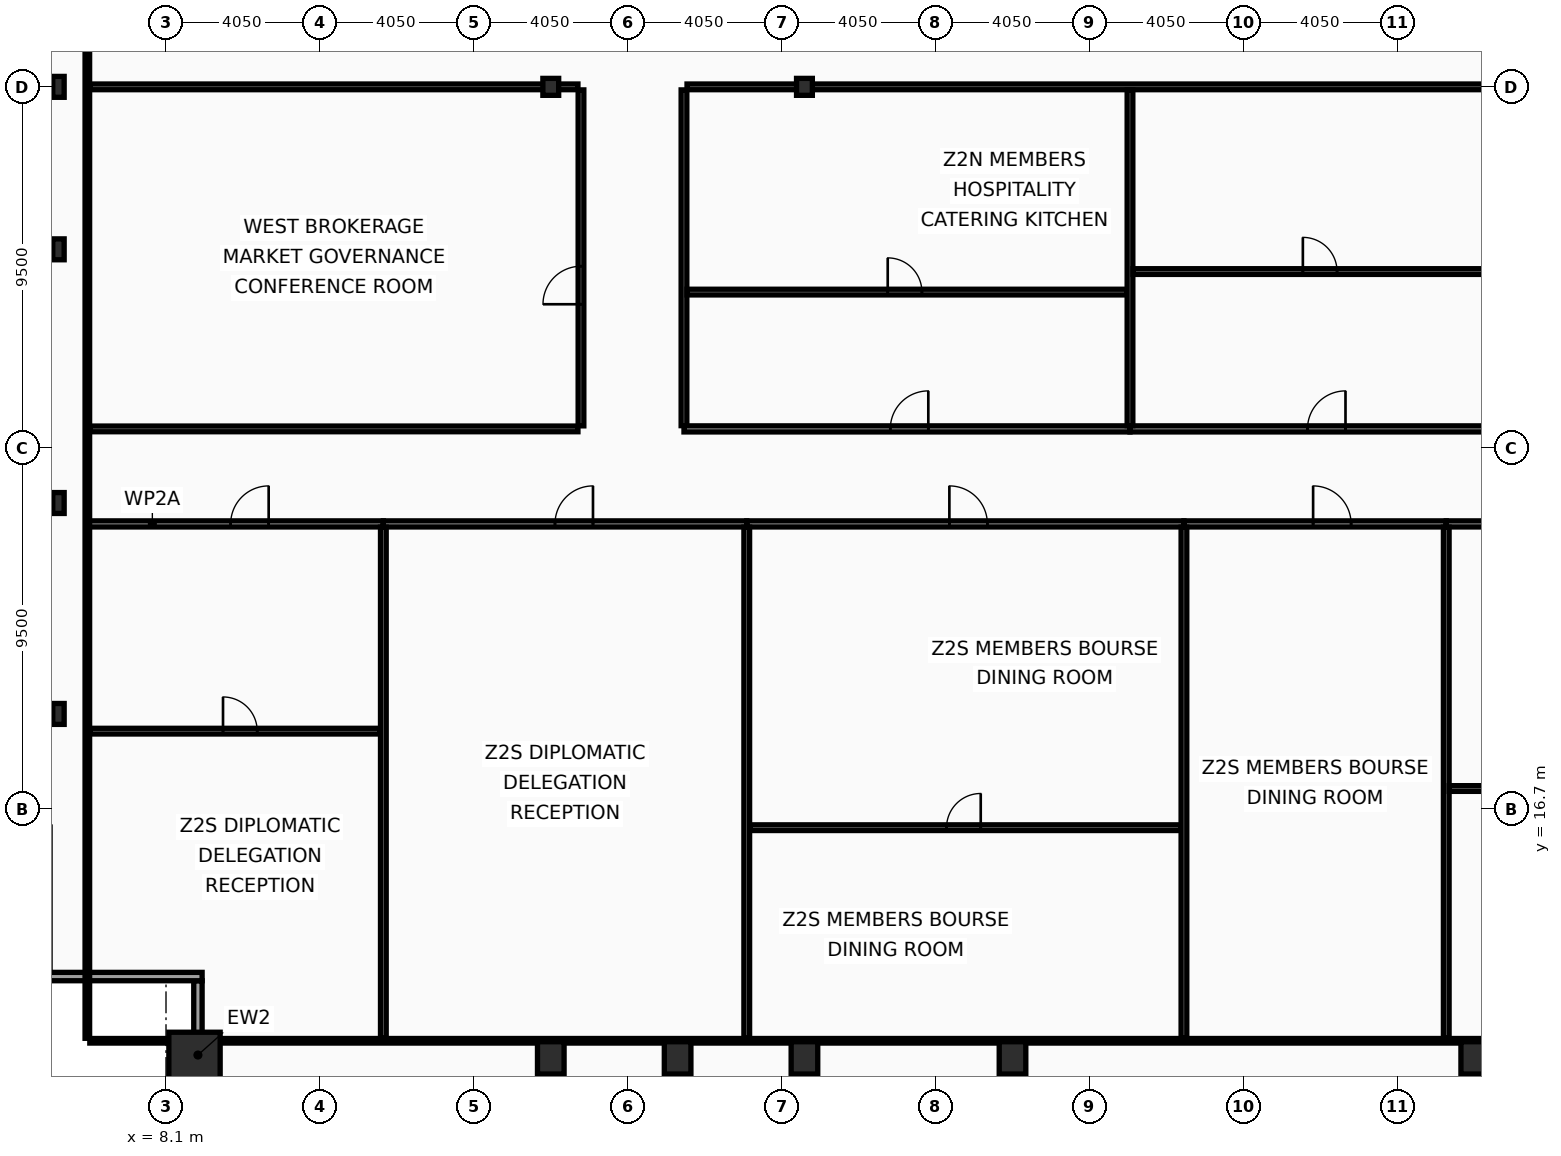
"""IFC4 building model, lengths in metres.
Left out: names, types, materials, properties, quantities, classifications, styles, units other than length and angle.
Written with IfcOpenShell. Run it as: python <this file> out.ifc"""

import sys

from ifc_helpers import new_model, si_unit, direction, frame, frame_2d, origin, origin_2d, place, context, subcontext, project, spatial, rectangle, hollow_rectangle, i_section, extrude, element, fill, save


model = new_model("IFC4")
c1 = context("Model", 3, precision=1e-05, world=origin(), true_north=direction((0.0, 1.0)))
c2 = subcontext(c1, "Body", "Model", "MODEL_VIEW")
j1 = project(units=[si_unit("LENGTHUNIT", "METRE"), si_unit("PLANEANGLEUNIT", "RADIAN")], contexts=[c1])
p1 = place(None, origin())
s1 = spatial("IfcSite", under=j1, at=p1, CompositionType="ELEMENT")
p2 = place(p1, origin())
s2 = spatial("IfcBuilding", under=s1, at=p2, CompositionType="ELEMENT")
p3 = place(p2, frame((0.0, 0.0, 143.4)))
s3 = spatial("IfcBuildingStorey", under=s2, at=p3, CompositionType="ELEMENT", Elevation=143.4)
p4 = place(p3, frame((8.85, 10.15, 0.0), z_axis=(0.0, 0.0, 1.0), x_axis=(1.0, 0.0, 0.0)))
e1 = element("IfcColumn", 1, at=p4, inside=s3, PredefinedType="COLUMN", context=c2, shape_type="SweptSolid", body=[
    extrude(hollow_rectangle(XDim=1.35, YDim=1.35, WallThickness=0.065, at=origin_2d()), origin(), (0.0, 0.0, 1.0), 3.6),
])
for number, where, z_axis, x_axis in (
    (2, (18.225, 10.15, 0.0), (0.0, 0.0, 1.0), (1.0, 0.0, 0.0)),
    (3, (21.562, 10.15, 0.0), (0.0, 0.0, 1.0), (1.0, 0.0, 0.0)),
    (4, (24.9, 10.15, 0.0), (0.0, 0.0, 1.0), (1.0, 0.0, 0.0)),
    (5, (30.375, 10.15, 0.0), (0.0, 0.0, 1.0), (1.0, 0.0, 0.0)),
    (6, (42.525, 10.15, 0.0), (0.0, 0.0, 1.0), (1.0, 0.0, 0.0)),
):
    element("IfcColumn", number, at=place(p3, frame(where, z_axis=z_axis, x_axis=x_axis)), inside=s3, PredefinedType="COLUMN", context=c2, shape_type="SweptSolid", body=[
        extrude(hollow_rectangle(XDim=0.7, YDim=0.85, WallThickness=0.05, at=origin_2d()), origin(), (0.0, 0.0, 1.0), 3.6),
    ])
for number, where, z_axis, x_axis in (
    (7, (5.27, 19.2, 0.0), (0.0, 0.0, 1.0), (1.0, 0.0, 0.0)),
    (8, (5.27, 24.75, 0.0), (0.0, 0.0, 1.0), (1.0, 0.0, 0.0)),
    (9, (5.27, 31.425, 0.0), (0.0, 0.0, 1.0), (1.0, 0.0, 0.0)),
    (10, (5.27, 35.7, 0.0), (0.0, 0.0, 1.0), (1.0, 0.0, 0.0)),
):
    element("IfcColumn", number, at=place(p3, frame(where, z_axis=z_axis, x_axis=x_axis)), inside=s3, PredefinedType="COLUMN", context=c2, shape_type="SweptSolid", body=[
        extrude(i_section(OverallWidth=0.3, OverallDepth=0.55, WebThickness=0.015, FlangeThickness=0.029, at=origin_2d()), origin(), (0.0, 0.0, 1.0), 3.6),
    ])
for number, where, z_axis, x_axis in (
    (11, (18.225, 35.7, 0.0), (0.0, 0.0, 1.0), (1.0, 0.0, 0.0)),
    (12, (24.9, 35.7, 0.0), (0.0, 0.0, 1.0), (1.0, 0.0, 0.0)),
):
    element("IfcColumn", number, at=place(p3, frame(where, z_axis=z_axis, x_axis=x_axis)), inside=s3, PredefinedType="COLUMN", context=c2, shape_type="SweptSolid", body=[
        extrude(i_section(OverallWidth=0.416, OverallDepth=0.446, WebThickness=0.039, FlangeThickness=0.063, at=origin_2d()), origin(), (0.0, 0.0, 1.0), 3.6),
    ])
p5 = place(p3, frame((8.94, 8.27, 0.0), z_axis=(0.0, 0.0, 1.0), x_axis=(0.0, 1.0, 0.0)))
e13 = element("IfcWall", 13, at=p5, inside=s3, PredefinedType="SOLIDWALL", context=c2, shape_type="SweptSolid", body=[
    extrude(rectangle(XDim=3.91, YDim=0.22, at=frame_2d((1.955, 0.0))), origin(), (0.0, 0.0, 1.0), 2.83),
])
p6 = place(p3, frame((9.05, 12.29, 0.0), z_axis=(0.0, 0.0, 1.0), x_axis=(-1.0, 0.0, 0.0)))
e14 = element("IfcWall", 14, at=p6, inside=s3, PredefinedType="SOLIDWALL", context=c2, shape_type="SweptSolid", body=[
    extrude(rectangle(XDim=4.22, YDim=0.22, at=frame_2d((2.11, 0.0))), origin(), (0.0, 0.0, 1.0), 2.83),
])
p7 = place(p3, frame((6.03, 24.2, 0.0), z_axis=(0.0, 0.0, 1.0), x_axis=(1.0, 0.0, 0.0)))
e15 = element("IfcWall", 15, at=p7, inside=s3, PredefinedType="PARTITIONING", context=c2, shape_type="SweptSolid", body=[
    extrude(rectangle(XDim=7.789, YDim=0.16, at=frame_2d((3.895, 0.0))), origin(), (0.0, 0.0, 1.0), 3.44),
])
p8 = place(p7, frame((3.771, 0.0, 0.0)))
e16 = element("IfcOpeningElement", 16, at=p8, cuts=e15, PredefinedType="OPENING", context=c2, shape_type="SweptSolid", body=[
    extrude(rectangle(XDim=1.0, YDim=2.05, at=frame_2d((0.5, 1.025))), frame((0.0, 0.09, 0.0), z_axis=(0.0, -1.0, 0.0), x_axis=(1.0, 0.0, 0.0)), (0.0, 0.0, 1.0), 0.18),
])
p9 = place(p3, frame((6.095, 18.747, 0.0), z_axis=(0.0, 0.0, 1.0), x_axis=(1.0, 0.0, 0.0)))
e17 = element("IfcWall", 17, at=p9, inside=s3, PredefinedType="PARTITIONING", context=c2, shape_type="SweptSolid", body=[
    extrude(rectangle(XDim=7.644, YDim=0.15, at=frame_2d((3.822, 0.0))), origin(), (0.0, 0.0, 1.0), 2.73),
])
p10 = place(p9, frame((3.505, 0.0, 0.0)))
e18 = element("IfcOpeningElement", 18, at=p10, cuts=e17, PredefinedType="OPENING", context=c2, shape_type="SweptSolid", body=[
    extrude(rectangle(XDim=0.9, YDim=2.05, at=frame_2d((0.45, 1.025))), frame((0.0, 0.085, 0.0), z_axis=(0.0, -1.0, 0.0), x_axis=(1.0, 0.0, 0.0)), (0.0, 0.0, 1.0), 0.17),
])
p11 = place(p3, frame((13.819, 24.2, 0.0), z_axis=(0.0, 0.0, 1.0), x_axis=(1.0, 0.0, 0.0)))
e19 = element("IfcWall", 19, at=p11, inside=s3, PredefinedType="PARTITIONING", context=c2, shape_type="SweptSolid", body=[
    extrude(rectangle(XDim=9.563, YDim=0.16, at=frame_2d((4.781, 0.0))), origin(), (0.0, 0.0, 1.0), 2.73),
])
p12 = place(p11, frame((4.516, 0.0, 0.0)))
e20 = element("IfcOpeningElement", 20, at=p12, cuts=e19, PredefinedType="OPENING", context=c2, shape_type="SweptSolid", body=[
    extrude(rectangle(XDim=1.0, YDim=2.05, at=frame_2d((0.5, 1.025))), frame((0.0, 0.09, 0.0), z_axis=(0.0, -1.0, 0.0), x_axis=(1.0, 0.0, 0.0)), (0.0, 0.0, 1.0), 0.18),
])
p13 = place(p3, frame((13.819, 10.665, 0.0), z_axis=(0.0, 0.0, 1.0), x_axis=(0.0, 1.0, 0.0)))
e21 = element("IfcWall", 21, at=p13, inside=s3, PredefinedType="PARTITIONING", context=c2, shape_type="SweptSolid", body=[
    extrude(rectangle(XDim=13.45, YDim=0.15, at=frame_2d((6.725, 0.0))), origin(), (0.0, 0.0, 1.0), 2.73),
])
p14 = place(p3, frame((23.382, 24.2, 0.0), z_axis=(0.0, 0.0, 1.0), x_axis=(1.0, 0.0, 0.0)))
e22 = element("IfcWall", 22, at=p14, inside=s3, PredefinedType="PARTITIONING", context=c2, shape_type="SweptSolid", body=[
    extrude(rectangle(XDim=11.504, YDim=0.16, at=frame_2d((5.752, 0.0))), origin(), (0.0, 0.0, 1.0), 2.73),
])
p15 = place(p14, frame((5.332, 0.0, 0.0)))
e23 = element("IfcOpeningElement", 23, at=p15, cuts=e22, PredefinedType="OPENING", context=c2, shape_type="SweptSolid", body=[
    extrude(rectangle(XDim=1.0, YDim=2.05, at=frame_2d((0.5, 1.025))), frame((0.0, 0.09, 0.0), z_axis=(0.0, -1.0, 0.0), x_axis=(1.0, 0.0, 0.0)), (0.0, 0.0, 1.0), 0.18),
])
p16 = place(p3, frame((23.382, 10.665, 0.0), z_axis=(0.0, 0.0, 1.0), x_axis=(0.0, 1.0, 0.0)))
e24 = element("IfcWall", 24, at=p16, inside=s3, PredefinedType="PARTITIONING", context=c2, shape_type="SweptSolid", body=[
    extrude(rectangle(XDim=13.45, YDim=0.15, at=frame_2d((6.725, 0.0))), origin(), (0.0, 0.0, 1.0), 2.93),
])
p17 = place(p3, frame((23.462, 16.207, 0.0), z_axis=(0.0, 0.0, 1.0), x_axis=(1.0, 0.0, 0.0)))
e25 = element("IfcWall", 25, at=p17, inside=s3, PredefinedType="PARTITIONING", context=c2, shape_type="SweptSolid", body=[
    extrude(rectangle(XDim=11.344, YDim=0.15, at=frame_2d((5.672, 0.0))), origin(), (0.0, 0.0, 1.0), 2.73),
])
p18 = place(p17, frame((5.177, 0.0, 0.0)))
e26 = element("IfcOpeningElement", 26, at=p18, cuts=e25, PredefinedType="OPENING", context=c2, shape_type="SweptSolid", body=[
    extrude(rectangle(XDim=0.9, YDim=2.05, at=frame_2d((0.45, 1.025))), frame((0.0, 0.085, 0.0), z_axis=(0.0, -1.0, 0.0), x_axis=(1.0, 0.0, 0.0)), (0.0, 0.0, 1.0), 0.17),
])
p19 = place(p3, frame((34.886, 24.2, 0.0), z_axis=(0.0, 0.0, 1.0), x_axis=(1.0, 0.0, 0.0)))
e27 = element("IfcWall", 27, at=p19, inside=s3, PredefinedType="PARTITIONING", context=c2, shape_type="SweptSolid", body=[
    extrude(rectangle(XDim=6.902, YDim=0.16, at=frame_2d((3.451, 0.0))), origin(), (0.0, 0.0, 1.0), 3.44),
])
p20 = place(p19, frame((3.399, 0.0, 0.0)))
e28 = element("IfcOpeningElement", 28, at=p20, cuts=e27, PredefinedType="OPENING", context=c2, shape_type="SweptSolid", body=[
    extrude(rectangle(XDim=1.0, YDim=2.05, at=frame_2d((0.5, 1.025))), frame((0.0, 0.09, 0.0), z_axis=(0.0, -1.0, 0.0), x_axis=(1.0, 0.0, 0.0)), (0.0, 0.0, 1.0), 0.18),
])
p21 = place(p3, frame((34.886, 10.665, 0.0), z_axis=(0.0, 0.0, 1.0), x_axis=(0.0, 1.0, 0.0)))
e29 = element("IfcWall", 29, at=p21, inside=s3, PredefinedType="PARTITIONING", context=c2, shape_type="SweptSolid", body=[
    extrude(rectangle(XDim=13.45, YDim=0.15, at=frame_2d((6.725, 0.0))), origin(), (0.0, 0.0, 1.0), 2.93),
])
p22 = place(p3, frame((41.789, 24.2, 0.0), z_axis=(0.0, 0.0, 1.0), x_axis=(1.0, 0.0, 0.0)))
e30 = element("IfcWall", 30, at=p22, inside=s3, PredefinedType="PARTITIONING", context=c2, shape_type="SweptSolid", body=[
    extrude(rectangle(XDim=7.214, YDim=0.16, at=frame_2d((3.607, 0.0))), origin(), (0.0, 0.0, 1.0), 2.73),
])
p23 = place(p22, frame((3.53, 0.0, 0.0)))
e31 = element("IfcOpeningElement", 31, at=p23, cuts=e30, PredefinedType="OPENING", context=c2, shape_type="SweptSolid", body=[
    extrude(rectangle(XDim=1.0, YDim=2.05, at=frame_2d((0.5, 1.025))), frame((0.0, 0.09, 0.0), z_axis=(0.0, -1.0, 0.0), x_axis=(1.0, 0.0, 0.0)), (0.0, 0.0, 1.0), 0.18),
])
p24 = place(p3, frame((41.789, 10.665, 0.0), z_axis=(0.0, 0.0, 1.0), x_axis=(0.0, 1.0, 0.0)))
e32 = element("IfcWall", 32, at=p24, inside=s3, PredefinedType="PARTITIONING", context=c2, shape_type="SweptSolid", body=[
    extrude(rectangle(XDim=13.45, YDim=0.15, at=frame_2d((6.725, 0.0))), origin(), (0.0, 0.0, 1.0), 2.93),
])
p25 = place(p3, frame((41.869, 17.238, 0.0), z_axis=(0.0, 0.0, 1.0), x_axis=(1.0, 0.0, 0.0)))
e33 = element("IfcWall", 33, at=p25, inside=s3, PredefinedType="PARTITIONING", context=c2, shape_type="SweptSolid", body=[
    extrude(rectangle(XDim=7.054, YDim=0.15, at=frame_2d((3.527, 0.0))), origin(), (0.0, 0.0, 1.0), 2.73),
])
p26 = place(p25, frame((3.246, 0.0, 0.0)))
e34 = element("IfcOpeningElement", 34, at=p26, cuts=e33, PredefinedType="OPENING", context=c2, shape_type="SweptSolid", body=[
    extrude(rectangle(XDim=0.9, YDim=2.05, at=frame_2d((0.45, 1.025))), frame((0.0, 0.085, 0.0), z_axis=(0.0, -1.0, 0.0), x_axis=(1.0, 0.0, 0.0)), (0.0, 0.0, 1.0), 0.17),
])
p27 = place(p3, frame((19.02, 26.78, 0.0), z_axis=(0.0, 0.0, 1.0), x_axis=(0.0, 1.0, 0.0)))
e35 = element("IfcWall", 35, at=p27, inside=s3, PredefinedType="PARTITIONING", context=c2, shape_type="SweptSolid", body=[
    extrude(rectangle(XDim=8.84, YDim=0.15, at=frame_2d((4.42, 0.0))), origin(), (0.0, 0.0, 1.0), 2.93),
])
p28 = place(p27, frame((3.2, 0.0, 0.0)))
e36 = element("IfcOpeningElement", 36, at=p28, cuts=e35, PredefinedType="OPENING", context=c2, shape_type="SweptSolid", body=[
    extrude(rectangle(XDim=1.0, YDim=2.05, at=frame_2d((0.5, 1.025))), frame((0.0, 0.085, 0.0), z_axis=(0.0, -1.0, 0.0), x_axis=(1.0, 0.0, 0.0)), (0.0, 0.0, 1.0), 0.17),
])
for number, where, z_axis, x_axis in (
    (37, (6.095, 26.7, 0.0), (0.0, 0.0, 1.0), (1.0, 0.0, 0.0)),
    (38, (6.095, 35.7, 0.0), (0.0, 0.0, 1.0), (1.0, 0.0, 0.0)),
):
    element("IfcWall", number, at=place(p3, frame(where, z_axis=z_axis, x_axis=x_axis)), inside=s3, PredefinedType="PARTITIONING", context=c2, shape_type="SweptSolid", body=[
        extrude(rectangle(XDim=12.845, YDim=0.15, at=frame_2d((6.422, 0.0))), origin(), (0.0, 0.0, 1.0), 2.73),
    ])
p29 = place(p3, frame((21.73, 26.785, 0.0), z_axis=(0.0, 0.0, 1.0), x_axis=(0.0, 1.0, 0.0)))
e39 = element("IfcWall", 39, at=p29, inside=s3, PredefinedType="PARTITIONING", context=c2, shape_type="SweptSolid", body=[
    extrude(rectangle(XDim=8.835, YDim=0.15, at=frame_2d((4.417, 0.0))), origin(), (0.0, 0.0, 1.0), 2.93),
])
p30 = place(p3, frame((21.81, 35.7, 0.0), z_axis=(0.0, 0.0, 1.0), x_axis=(1.0, 0.0, 0.0)))
e40 = element("IfcWall", 40, at=p30, inside=s3, PredefinedType="PARTITIONING", context=c2, shape_type="SweptSolid", body=[
    extrude(rectangle(XDim=44.995, YDim=0.15, at=frame_2d((22.498, 0.0))), origin(), (0.0, 0.0, 1.0), 2.73),
])
p31 = place(p3, frame((21.73, 26.7, 0.0), z_axis=(0.0, 0.0, 1.0), x_axis=(1.0, 0.0, 0.0)))
e41 = element("IfcWall", 41, at=p31, inside=s3, PredefinedType="PARTITIONING", context=c2, shape_type="SweptSolid", body=[
    extrude(rectangle(XDim=11.736, YDim=0.16, at=frame_2d((5.868, 0.0))), origin(), (0.0, 0.0, 1.0), 2.73),
])
p32 = place(p31, frame((5.429, 0.0, 0.0)))
e42 = element("IfcOpeningElement", 42, at=p32, cuts=e41, PredefinedType="OPENING", context=c2, shape_type="SweptSolid", body=[
    extrude(rectangle(XDim=1.0, YDim=2.05, at=frame_2d((0.5, 1.025))), frame((0.0, 0.09, 0.0), z_axis=(0.0, -1.0, 0.0), x_axis=(1.0, 0.0, 0.0)), (0.0, 0.0, 1.0), 0.18),
])
p33 = place(p3, frame((21.81, 30.3, 0.0), z_axis=(0.0, 0.0, 1.0), x_axis=(1.0, 0.0, 0.0)))
e43 = element("IfcWall", 43, at=p33, inside=s3, PredefinedType="PARTITIONING", context=c2, shape_type="SweptSolid", body=[
    extrude(rectangle(XDim=11.576, YDim=0.15, at=frame_2d((5.788, 0.0))), origin(), (0.0, 0.0, 1.0), 2.73),
])
p34 = place(p33, frame((5.281, 0.0, 0.0)))
e44 = element("IfcOpeningElement", 44, at=p34, cuts=e43, PredefinedType="OPENING", context=c2, shape_type="SweptSolid", body=[
    extrude(rectangle(XDim=0.9, YDim=2.05, at=frame_2d((0.45, 1.025))), frame((0.0, 0.085, 0.0), z_axis=(0.0, -1.0, 0.0), x_axis=(1.0, 0.0, 0.0)), (0.0, 0.0, 1.0), 0.17),
])
p35 = place(p3, frame((33.466, 26.7, 0.0), z_axis=(0.0, 0.0, 1.0), x_axis=(1.0, 0.0, 0.0)))
e45 = element("IfcWall", 45, at=p35, inside=s3, PredefinedType="PARTITIONING", context=c2, shape_type="SweptSolid", body=[
    extrude(rectangle(XDim=9.931, YDim=0.16, at=frame_2d((4.965, 0.0))), origin(), (0.0, 0.0, 1.0), 2.73),
])
p36 = place(p35, frame((4.671, 0.0, 0.0)))
e46 = element("IfcOpeningElement", 46, at=p36, cuts=e45, PredefinedType="OPENING", context=c2, shape_type="SweptSolid", body=[
    extrude(rectangle(XDim=1.0, YDim=2.05, at=frame_2d((0.5, 1.025))), frame((0.0, 0.09, 0.0), z_axis=(0.0, -1.0, 0.0), x_axis=(1.0, 0.0, 0.0)), (0.0, 0.0, 1.0), 0.18),
])
p37 = place(p3, frame((33.466, 26.785, 0.0), z_axis=(0.0, 0.0, 1.0), x_axis=(0.0, 1.0, 0.0)))
e47 = element("IfcWall", 47, at=p37, inside=s3, PredefinedType="PARTITIONING", context=c2, shape_type="SweptSolid", body=[
    extrude(rectangle(XDim=8.835, YDim=0.15, at=frame_2d((4.417, 0.0))), origin(), (0.0, 0.0, 1.0), 2.93),
])
p38 = place(p3, frame((33.546, 30.84, 0.0), z_axis=(0.0, 0.0, 1.0), x_axis=(1.0, 0.0, 0.0)))
e48 = element("IfcWall", 48, at=p38, inside=s3, PredefinedType="PARTITIONING", context=c2, shape_type="SweptSolid", body=[
    extrude(rectangle(XDim=9.771, YDim=0.15, at=frame_2d((4.885, 0.0))), origin(), (0.0, 0.0, 1.0), 2.73),
])
p39 = place(p38, frame((4.469, 0.0, 0.0)))
e49 = element("IfcOpeningElement", 49, at=p39, cuts=e48, PredefinedType="OPENING", context=c2, shape_type="SweptSolid", body=[
    extrude(rectangle(XDim=0.9, YDim=2.05, at=frame_2d((0.45, 1.025))), frame((0.0, 0.085, 0.0), z_axis=(0.0, -1.0, 0.0), x_axis=(1.0, 0.0, 0.0)), (0.0, 0.0, 1.0), 0.17),
])
p40 = place(p3, frame((6.03, 10.665, 0.0), z_axis=(0.0, 0.0, 1.0), x_axis=(0.0, 1.0, 0.0)))
e50 = element("IfcWall", 50, at=p40, inside=s3, PredefinedType="PARTITIONING", context=c2, shape_type="SweptSolid", body=[
    extrude(rectangle(XDim=42.11, YDim=0.12, at=frame_2d((21.055, 0.0))), origin(), (0.0, 0.0, 1.0), 2.73),
])
p41 = place(p3, frame((6.095, 10.6, 0.0), z_axis=(0.0, 0.0, 1.0), x_axis=(1.0, 0.0, 0.0)))
e51 = element("IfcWall", 51, at=p41, inside=s3, PredefinedType="PARTITIONING", context=c2, shape_type="SweptSolid", body=[
    extrude(rectangle(XDim=60.71, YDim=0.12, at=frame_2d((30.355, 0.0))), origin(), (0.0, 0.0, 1.0), 2.73),
])
p42 = place(p8, origin())
e52 = element("IfcDoor", 52, at=p42, inside=s3, OperationType="SINGLE_SWING_RIGHT", PredefinedType="DOOR", context=c2, shape_type="SweptSolid", body=[
    extrude(rectangle(XDim=1.0, YDim=2.05, at=frame_2d((0.5, 1.025))), frame((0.0, 0.025, 0.0), z_axis=(0.0, -1.0, 0.0), x_axis=(1.0, 0.0, 0.0)), (0.0, 0.0, 1.0), 0.05),
])
fill(e16, e52)
p43 = place(p10, origin())
e53 = element("IfcDoor", 53, at=p43, inside=s3, OperationType="SINGLE_SWING_LEFT", PredefinedType="DOOR", context=c2, shape_type="SweptSolid", body=[
    extrude(rectangle(XDim=0.9, YDim=2.05, at=frame_2d((0.45, 1.025))), frame((0.0, 0.025, 0.0), z_axis=(0.0, -1.0, 0.0), x_axis=(1.0, 0.0, 0.0)), (0.0, 0.0, 1.0), 0.05),
])
fill(e18, e53)
p44 = place(p12, origin())
e54 = element("IfcDoor", 54, at=p44, inside=s3, OperationType="SINGLE_SWING_RIGHT", PredefinedType="DOOR", context=c2, shape_type="SweptSolid", body=[
    extrude(rectangle(XDim=1.0, YDim=2.05, at=frame_2d((0.5, 1.025))), frame((0.0, 0.025, 0.0), z_axis=(0.0, -1.0, 0.0), x_axis=(1.0, 0.0, 0.0)), (0.0, 0.0, 1.0), 0.05),
])
fill(e20, e54)
p45 = place(p15, origin())
e55 = element("IfcDoor", 55, at=p45, inside=s3, OperationType="SINGLE_SWING_LEFT", PredefinedType="DOOR", context=c2, shape_type="SweptSolid", body=[
    extrude(rectangle(XDim=1.0, YDim=2.05, at=frame_2d((0.5, 1.025))), frame((0.0, 0.025, 0.0), z_axis=(0.0, -1.0, 0.0), x_axis=(1.0, 0.0, 0.0)), (0.0, 0.0, 1.0), 0.05),
])
fill(e23, e55)
p46 = place(p18, origin())
e56 = element("IfcDoor", 56, at=p46, inside=s3, OperationType="SINGLE_SWING_RIGHT", PredefinedType="DOOR", context=c2, shape_type="SweptSolid", body=[
    extrude(rectangle(XDim=0.9, YDim=2.05, at=frame_2d((0.45, 1.025))), frame((0.0, 0.025, 0.0), z_axis=(0.0, -1.0, 0.0), x_axis=(1.0, 0.0, 0.0)), (0.0, 0.0, 1.0), 0.05),
])
fill(e26, e56)
p47 = place(p20, origin())
e57 = element("IfcDoor", 57, at=p47, inside=s3, OperationType="SINGLE_SWING_LEFT", PredefinedType="DOOR", context=c2, shape_type="SweptSolid", body=[
    extrude(rectangle(XDim=1.0, YDim=2.05, at=frame_2d((0.5, 1.025))), frame((0.0, 0.025, 0.0), z_axis=(0.0, -1.0, 0.0), x_axis=(1.0, 0.0, 0.0)), (0.0, 0.0, 1.0), 0.05),
])
fill(e28, e57)
p48 = place(p28, origin())
e58 = element("IfcDoor", 58, at=p48, inside=s3, OperationType="SINGLE_SWING_LEFT", PredefinedType="DOOR", context=c2, shape_type="SweptSolid", body=[
    extrude(rectangle(XDim=1.0, YDim=2.05, at=frame_2d((0.5, 1.025))), frame((0.0, 0.025, 0.0), z_axis=(0.0, -1.0, 0.0), x_axis=(1.0, 0.0, 0.0)), (0.0, 0.0, 1.0), 0.05),
])
fill(e36, e58)
p49 = place(p32, origin())
e59 = element("IfcDoor", 59, at=p49, inside=s3, OperationType="SINGLE_SWING_RIGHT", PredefinedType="DOOR", context=c2, shape_type="SweptSolid", body=[
    extrude(rectangle(XDim=1.0, YDim=2.05, at=frame_2d((0.5, 1.025))), frame((0.0, 0.025, 0.0), z_axis=(0.0, -1.0, 0.0), x_axis=(1.0, 0.0, 0.0)), (0.0, 0.0, 1.0), 0.05),
])
fill(e42, e59)
p50 = place(p34, origin())
e60 = element("IfcDoor", 60, at=p50, inside=s3, OperationType="SINGLE_SWING_LEFT", PredefinedType="DOOR", context=c2, shape_type="SweptSolid", body=[
    extrude(rectangle(XDim=0.9, YDim=2.05, at=frame_2d((0.45, 1.025))), frame((0.0, 0.025, 0.0), z_axis=(0.0, -1.0, 0.0), x_axis=(1.0, 0.0, 0.0)), (0.0, 0.0, 1.0), 0.05),
])
fill(e44, e60)
p51 = place(p36, origin())
e61 = element("IfcDoor", 61, at=p51, inside=s3, OperationType="SINGLE_SWING_RIGHT", PredefinedType="DOOR", context=c2, shape_type="SweptSolid", body=[
    extrude(rectangle(XDim=1.0, YDim=2.05, at=frame_2d((0.5, 1.025))), frame((0.0, 0.025, 0.0), z_axis=(0.0, -1.0, 0.0), x_axis=(1.0, 0.0, 0.0)), (0.0, 0.0, 1.0), 0.05),
])
fill(e46, e61)
p52 = place(p39, origin())
e62 = element("IfcDoor", 62, at=p52, inside=s3, OperationType="SINGLE_SWING_LEFT", PredefinedType="DOOR", context=c2, shape_type="SweptSolid", body=[
    extrude(rectangle(XDim=0.9, YDim=2.05, at=frame_2d((0.45, 1.025))), frame((0.0, 0.025, 0.0), z_axis=(0.0, -1.0, 0.0), x_axis=(1.0, 0.0, 0.0)), (0.0, 0.0, 1.0), 0.05),
])
fill(e49, e62)
save(model, sys.argv[1])
